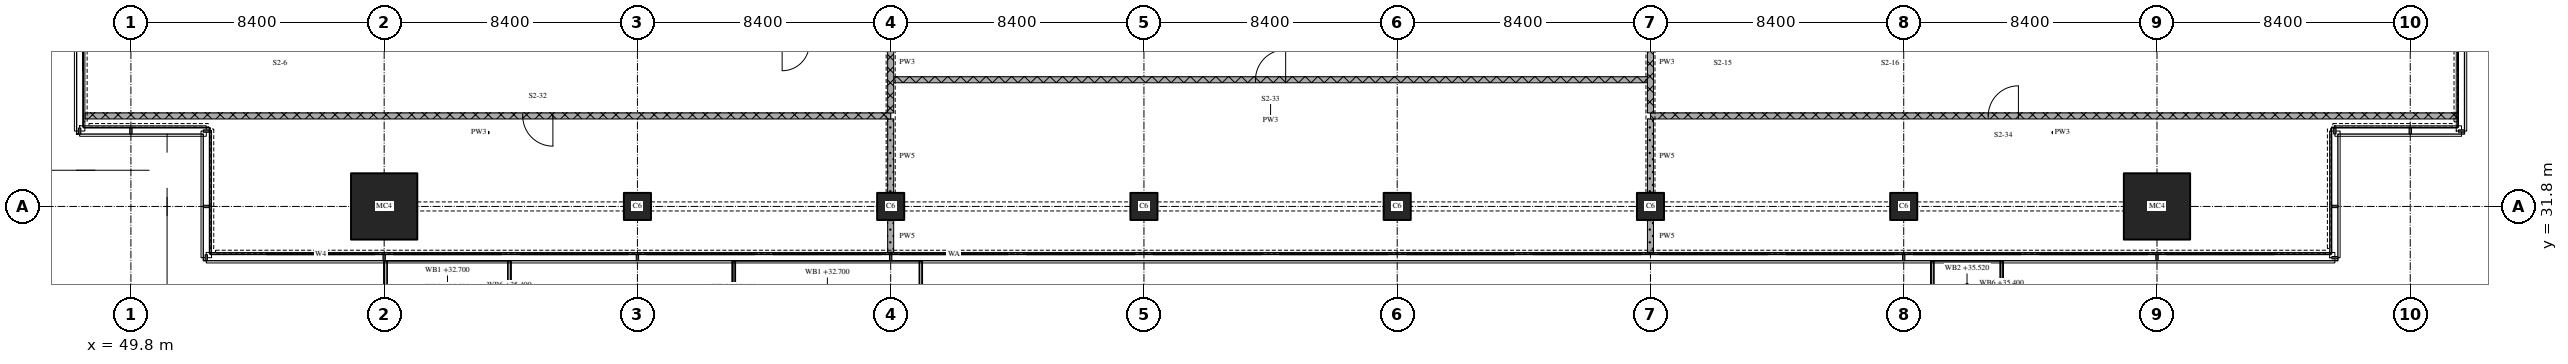
"""IFC4 building model, lengths in metres.
Left out: names, types, materials, properties, quantities, classifications, styles, units other than length and angle.
Written with IfcOpenShell. Run it as: python <this file> out.ifc"""

import sys

from ifc_helpers import new_model, si_unit, direction, frame, frame_2d, origin, origin_2d, place, context, subcontext, project, spatial, polyline, rectangle, outline, extrude, element, fill, save


model = new_model("IFC4")
c1 = context("Model", 3, precision=1e-05, world=origin(), true_north=direction((0.0, 1.0)))
c2 = subcontext(c1, "Body", "Model", "MODEL_VIEW")
j1 = project(units=[si_unit("LENGTHUNIT", "METRE"), si_unit("PLANEANGLEUNIT", "RADIAN")], contexts=[c1])
p1 = place(None, origin())
s1 = spatial("IfcSite", under=j1, at=p1, CompositionType="ELEMENT")
p2 = place(p1, origin())
s2 = spatial("IfcBuilding", under=s1, at=p2, CompositionType="ELEMENT")
p3 = place(p2, frame((0.0, 0.0, 32.7)))
s3 = spatial("IfcBuildingStorey", under=s2, at=p3, CompositionType="ELEMENT", Elevation=32.7)
p4 = place(p3, frame((58.2, 31.8, 0.0), z_axis=(0.0, 0.0, 1.0), x_axis=(1.0, 0.0, 0.0)))
e1 = element("IfcColumn", 1, at=p4, inside=s3, PredefinedType="COLUMN", context=c2, shape_type="SweptSolid", body=[
    extrude(rectangle(XDim=2.2, YDim=2.2, at=origin_2d()), origin(), (0.0, 0.0, 1.0), 4.5),
])
for number, where, z_axis, x_axis in (
    (2, (66.6, 31.8, 0.0), (0.0, 0.0, 1.0), (1.0, 0.0, 0.0)),
    (3, (75.0, 31.8, 0.0), (0.0, 0.0, 1.0), (1.0, 0.0, 0.0)),
    (4, (83.4, 31.8, 0.0), (0.0, 0.0, 1.0), (1.0, 0.0, 0.0)),
    (5, (91.8, 31.8, 0.0), (0.0, 0.0, 1.0), (1.0, 0.0, 0.0)),
    (6, (100.2, 31.8, 0.0), (0.0, 0.0, 1.0), (1.0, 0.0, 0.0)),
    (7, (108.6, 31.8, 0.0), (0.0, 0.0, 1.0), (1.0, 0.0, 0.0)),
):
    element("IfcColumn", number, at=place(p3, frame(where, z_axis=z_axis, x_axis=x_axis)), inside=s3, PredefinedType="COLUMN", context=c2, shape_type="SweptSolid", body=[
        extrude(rectangle(XDim=0.9, YDim=0.9, at=origin_2d()), origin(), (0.0, 0.0, 1.0), 4.5),
    ])
p5 = place(p3, frame((117.0, 31.8, 0.0), z_axis=(0.0, 0.0, 1.0), x_axis=(1.0, 0.0, 0.0)))
e8 = element("IfcColumn", 8, at=p5, inside=s3, PredefinedType="COLUMN", context=c2, shape_type="SweptSolid", body=[
    extrude(rectangle(XDim=2.2, YDim=2.2, at=origin_2d()), origin(), (0.0, 0.0, 1.0), 4.5),
])
p6 = place(p3, origin())
e9 = element("IfcWall", 9, at=p6, inside=s3, PredefinedType="SOLIDWALL", context=c2, shape_type="SweptSolid", body=[
    extrude(outline(polyline([(58.2, 30.0), (58.3, 30.0), (58.3, 28.367), (62.3, 28.367), (62.3, 30.0), (62.4, 30.0), (62.4, 28.267), (58.2, 28.267), (58.2, 30.0)])), origin(), (0.0, 0.0, 1.0), 1.0),
])
p7 = place(p3, origin())
e10 = element("IfcWall", 10, at=p7, inside=s3, PredefinedType="SOLIDWALL", context=c2, shape_type="SweptSolid", body=[
    extrude(outline(polyline([(69.75, 30.0), (69.85, 30.0), (69.85, 28.233), (75.95, 28.233), (75.95, 30.0), (76.05, 30.0), (76.05, 28.133), (69.75, 28.133), (69.75, 30.0)])), origin(), (0.0, 0.0, 1.0), 1.0),
])
p8 = place(p3, origin())
e11 = element("IfcWall", 11, at=p8, inside=s3, PredefinedType="SOLIDWALL", context=c2, shape_type="SweptSolid", body=[
    extrude(outline(polyline([(109.5, 30.0), (109.6, 30.0), (109.6, 28.5), (111.8, 28.5), (111.8, 30.0), (111.9, 30.0), (111.9, 28.4), (109.5, 28.4), (109.5, 30.0)])), origin(), (0.0, 0.0, 1.0), 1.0),
])
p9 = place(p3, frame((75.0, 34.8, 0.0), z_axis=(0.0, 0.0, 1.0), x_axis=(-1.0, 0.0, 0.0)))
e12 = element("IfcWall", 12, at=p9, inside=s3, PredefinedType="PARTITIONING", context=c2, shape_type="SweptSolid", body=[
    extrude(rectangle(XDim=26.72, YDim=0.2, at=frame_2d((13.36, 0.0))), origin(), (0.0, 0.0, 1.0), 4.22),
])
p10 = place(p9, frame((11.204, 0.0, 0.0)))
e13 = element("IfcOpeningElement", 13, at=p10, cuts=e12, PredefinedType="OPENING", context=c2, shape_type="SweptSolid", body=[
    extrude(rectangle(XDim=1.0, YDim=2.1, at=frame_2d((0.5, 1.05))), frame((0.0, 0.11, 0.0), z_axis=(0.0, -1.0, 0.0), x_axis=(1.0, 0.0, 0.0)), (0.0, 0.0, 1.0), 0.22),
])
p11 = place(p3, frame((126.92, 34.8, 0.0), z_axis=(0.0, 0.0, 1.0), x_axis=(-1.0, 0.0, 0.0)))
e14 = element("IfcWall", 14, at=p11, inside=s3, PredefinedType="PARTITIONING", context=c2, shape_type="SweptSolid", body=[
    extrude(rectangle(XDim=26.72, YDim=0.2, at=frame_2d((13.36, 0.0))), origin(), (0.0, 0.0, 1.0), 4.22),
])
p12 = place(p11, frame((14.516, 0.0, 0.0)))
e15 = element("IfcOpeningElement", 15, at=p12, cuts=e14, PredefinedType="OPENING", context=c2, shape_type="SweptSolid", body=[
    extrude(rectangle(XDim=1.0, YDim=2.1, at=frame_2d((0.5, 1.05))), frame((0.0, 0.11, 0.0), z_axis=(0.0, -1.0, 0.0), x_axis=(1.0, 0.0, 0.0)), (0.0, 0.0, 1.0), 0.22),
])
p13 = place(p3, frame((100.1, 36.0, 0.0), z_axis=(0.0, 0.0, 1.0), x_axis=(-1.0, 0.0, 0.0)))
e16 = element("IfcWall", 16, at=p13, inside=s3, PredefinedType="PARTITIONING", context=c2, shape_type="SweptSolid", body=[
    extrude(rectangle(XDim=25.0, YDim=0.2, at=frame_2d((12.5, 0.0))), origin(), (0.0, 0.0, 1.0), 4.22),
])
p14 = place(p13, frame((12.0, 0.0, 0.0)))
e17 = element("IfcOpeningElement", 17, at=p14, cuts=e16, PredefinedType="OPENING", context=c2, shape_type="SweptSolid", body=[
    extrude(rectangle(XDim=1.0, YDim=2.1, at=frame_2d((0.5, 1.05))), frame((0.0, 0.11, 0.0), z_axis=(0.0, -1.0, 0.0), x_axis=(1.0, 0.0, 0.0)), (0.0, 0.0, 1.0), 0.22),
])
p15 = place(p3, frame((75.0, 38.3, 0.0), z_axis=(0.0, 0.0, 1.0), x_axis=(0.0, -1.0, 0.0)))
e18 = element("IfcWall", 18, at=p15, inside=s3, PredefinedType="PARTITIONING", context=c2, shape_type="SweptSolid", body=[
    extrude(rectangle(XDim=3.4, YDim=0.2, at=frame_2d((1.7, 0.0))), origin(), (0.0, 0.0, 1.0), 3.73),
])
p16 = place(p3, frame((75.0, 31.33, 0.0), z_axis=(0.0, 0.0, 1.0), x_axis=(0.0, -1.0, 0.0)))
e19 = element("IfcWall", 19, at=p16, inside=s3, PredefinedType="PARTITIONING", context=c2, shape_type="SweptSolid", body=[
    extrude(rectangle(XDim=1.05, YDim=0.2, at=frame_2d((0.525, 0.0))), origin(), (0.0, 0.0, 1.0), 4.22),
])
p17 = place(p3, frame((75.0, 34.7, 0.0), z_axis=(0.0, 0.0, 1.0), x_axis=(0.0, -1.0, 0.0)))
e20 = element("IfcWall", 20, at=p17, inside=s3, PredefinedType="PARTITIONING", context=c2, shape_type="SweptSolid", body=[
    extrude(rectangle(XDim=2.43, YDim=0.2, at=frame_2d((1.215, 0.0))), origin(), (0.0, 0.0, 1.0), 3.73),
])
p18 = place(p3, frame((100.2, 38.3, 0.0), z_axis=(0.0, 0.0, 1.0), x_axis=(0.0, -1.0, 0.0)))
e21 = element("IfcWall", 21, at=p18, inside=s3, PredefinedType="PARTITIONING", context=c2, shape_type="SweptSolid", body=[
    extrude(rectangle(XDim=3.4, YDim=0.2, at=frame_2d((1.7, 0.0))), origin(), (0.0, 0.0, 1.0), 3.73),
])
p19 = place(p3, frame((100.2, 31.33, 0.0), z_axis=(0.0, 0.0, 1.0), x_axis=(0.0, -1.0, 0.0)))
e22 = element("IfcWall", 22, at=p19, inside=s3, PredefinedType="PARTITIONING", context=c2, shape_type="SweptSolid", body=[
    extrude(rectangle(XDim=1.05, YDim=0.2, at=frame_2d((0.525, 0.0))), origin(), (0.0, 0.0, 1.0), 4.22),
])
p20 = place(p3, frame((100.2, 34.7, 0.0), z_axis=(0.0, 0.0, 1.0), x_axis=(0.0, -1.0, 0.0)))
e23 = element("IfcWall", 23, at=p20, inside=s3, PredefinedType="PARTITIONING", context=c2, shape_type="SweptSolid", body=[
    extrude(rectangle(XDim=2.43, YDim=0.2, at=frame_2d((1.215, 0.0))), origin(), (0.0, 0.0, 1.0), 3.73),
])
p21 = place(p10, origin())
e24 = element("IfcDoor", 24, at=p21, inside=s3, OperationType="SINGLE_SWING_LEFT", PredefinedType="DOOR", context=c2, shape_type="SweptSolid", body=[
    extrude(rectangle(XDim=1.0, YDim=2.1, at=frame_2d((0.5, 1.05))), frame((0.0, 0.025, 0.0), z_axis=(0.0, -1.0, 0.0), x_axis=(1.0, 0.0, 0.0)), (0.0, 0.0, 1.0), 0.05),
])
fill(e13, e24)
p22 = place(p12, origin())
e25 = element("IfcDoor", 25, at=p22, inside=s3, OperationType="SINGLE_SWING_RIGHT", PredefinedType="DOOR", context=c2, shape_type="SweptSolid", body=[
    extrude(rectangle(XDim=1.0, YDim=2.1, at=frame_2d((0.5, 1.05))), frame((0.0, 0.025, 0.0), z_axis=(0.0, -1.0, 0.0), x_axis=(1.0, 0.0, 0.0)), (0.0, 0.0, 1.0), 0.05),
])
fill(e15, e25)
p23 = place(p14, origin())
e26 = element("IfcDoor", 26, at=p23, inside=s3, OperationType="SINGLE_SWING_RIGHT", PredefinedType="DOOR", context=c2, shape_type="SweptSolid", body=[
    extrude(rectangle(XDim=1.0, YDim=2.1, at=frame_2d((0.5, 1.05))), frame((0.0, 0.025, 0.0), z_axis=(0.0, -1.0, 0.0), x_axis=(1.0, 0.0, 0.0)), (0.0, 0.0, 1.0), 0.05),
])
fill(e17, e26)
save(model, sys.argv[1])
